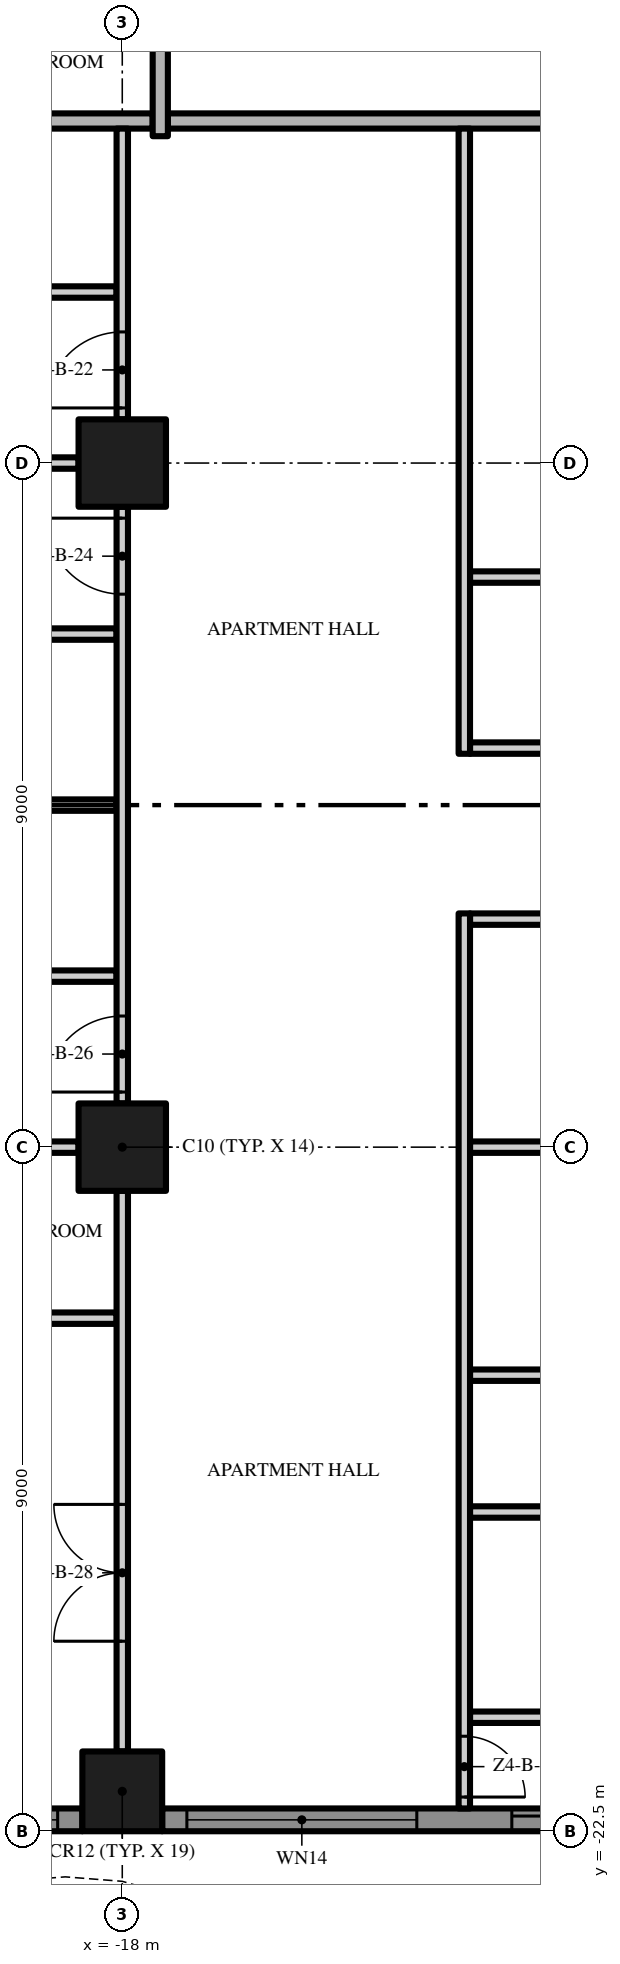
"""IFC4 building model, lengths in metres.
Left out: names, types, materials, properties, quantities, classifications, styles, units other than length and angle.
Written with IfcOpenShell. Run it as: python <this file> out.ifc"""

import sys

from ifc_helpers import new_model, si_unit, direction, frame, frame_2d, origin, origin_2d, place, context, subcontext, project, spatial, polyline, rectangle, outline, extrude, element, fill, save


model = new_model("IFC4")
c1 = context("Model", 3, precision=1e-05, world=origin(), true_north=direction((0.0, 1.0)))
c2 = subcontext(c1, "Body", "Model", "MODEL_VIEW")
j1 = project(units=[si_unit("LENGTHUNIT", "METRE"), si_unit("PLANEANGLEUNIT", "RADIAN")], contexts=[c1])
p1 = place(None, origin())
s1 = spatial("IfcSite", under=j1, at=p1, CompositionType="ELEMENT")
p2 = place(p1, origin())
s2 = spatial("IfcBuilding", under=s1, at=p2, CompositionType="ELEMENT")
p3 = place(p2, frame((0.0, 0.0, 195.8)))
s3 = spatial("IfcBuildingStorey", under=s2, at=p3, CompositionType="ELEMENT", Elevation=195.8)
p4 = place(p3, frame((-18.0, -13.5, 0.0), z_axis=(0.0, 0.0, 1.0), x_axis=(1.0, 0.0, 0.0)))
e1 = element("IfcColumn", 1, at=p4, inside=s3, PredefinedType="COLUMN", context=c2, shape_type="SweptSolid", body=[
    extrude(rectangle(XDim=1.15, YDim=1.15, at=origin_2d()), origin(), (0.0, 0.0, 1.0), 3.5),
])
p5 = place(p3, frame((-18.0, -21.975, 0.0), z_axis=(0.0, 0.0, 1.0), x_axis=(1.0, 0.0, 0.0)))
e2 = element("IfcColumn", 2, at=p5, inside=s3, PredefinedType="COLUMN", context=c2, shape_type="SweptSolid", body=[
    extrude(rectangle(XDim=1.05, YDim=1.05, at=origin_2d()), origin(), (0.0, 0.0, 1.0), 3.5),
])
p6 = place(p3, frame((-18.0, -4.5, 0.0), z_axis=(0.0, 0.0, 1.0), x_axis=(1.0, 0.0, 0.0)))
e3 = element("IfcColumn", 3, at=p6, inside=s3, PredefinedType="COLUMN", context=c2, shape_type="SweptSolid", body=[
    extrude(rectangle(XDim=1.15, YDim=1.15, at=origin_2d()), origin(), (0.0, 0.0, 1.0), 3.5),
])
p7 = place(p3, frame((-18.525, -22.35, 0.0), z_axis=(0.0, 0.0, 1.0), x_axis=(-1.0, 0.0, 0.0)))
e4 = element("IfcWall", 4, at=p7, inside=s3, PredefinedType="SOLIDWALL", context=c2, shape_type="SweptSolid", body=[
    extrude(rectangle(XDim=3.675, YDim=0.3, at=frame_2d((1.837, 0.0))), origin(), (0.0, 0.0, 1.0), 3.5),
])
p8 = place(p7, frame((0.325, 0.0, 0.45)))
e5 = element("IfcOpeningElement", 5, at=p8, cuts=e4, PredefinedType="OPENING", context=c2, shape_type="SweptSolid", body=[
    extrude(rectangle(XDim=3.025, YDim=2.65, at=frame_2d((1.512, 1.325))), frame((0.0, 0.16, 0.0), z_axis=(0.0, -1.0, 0.0), x_axis=(1.0, 0.0, 0.0)), (0.0, 0.0, 1.0), 0.32),
])
p9 = place(p3, frame((-9.525, -22.35, 0.0), z_axis=(0.0, 0.0, 1.0), x_axis=(-1.0, 0.0, 0.0)))
e6 = element("IfcWall", 6, at=p9, inside=s3, PredefinedType="SOLIDWALL", context=c2, shape_type="SweptSolid", body=[
    extrude(rectangle(XDim=7.95, YDim=0.3, at=frame_2d((3.975, 0.0))), origin(), (0.0, 0.0, 1.0), 3.5),
])
p10 = place(p9, frame((4.6, 0.0, 0.45)))
e7 = element("IfcOpeningElement", 7, at=p10, cuts=e6, PredefinedType="OPENING", context=c2, shape_type="SweptSolid", body=[
    extrude(rectangle(XDim=3.025, YDim=2.65, at=frame_2d((1.512, 1.325))), frame((0.0, 0.16, 0.0), z_axis=(0.0, -1.0, 0.0), x_axis=(1.0, 0.0, 0.0)), (0.0, 0.0, 1.0), 0.32),
])
p11 = place(p9, frame((0.325, 0.0, 0.0)))
e8 = element("IfcOpeningElement", 8, at=p11, cuts=e6, PredefinedType="OPENING", context=c2, shape_type="SweptSolid", body=[
    extrude(rectangle(XDim=3.025, YDim=2.4, at=frame_2d((1.512, 1.2))), frame((0.0, 0.16, 0.0), z_axis=(0.0, -1.0, 0.0), x_axis=(1.0, 0.0, 0.0)), (0.0, 0.0, 1.0), 0.32),
])
p12 = place(p3, origin())
e9 = element("IfcWall", 9, at=p12, inside=s3, PredefinedType="USERDEFINED", context=c2, shape_type="SweptSolid", body=[
    extrude(outline(polyline([(-22.5, -24.3), (-21.0, -23.595), (-19.5, -23.159), (-18.75, -23.1), (-18.0, -23.159), (-16.5, -23.595), (-15.0, -24.3), (-13.5, -25.005), (-12.0, -25.441), (-11.25, -25.5), (-10.5, -25.441), (-9.0, -25.005), (-7.5, -24.3), (-6.0, -23.595), (-4.5, -23.159), (-3.75, -23.1), (-3.0, -23.159), (-1.5, -23.595), (0.0, -24.3), (1.5, -25.005), (3.0, -25.441), (3.75, -25.5), (4.5, -25.441), (6.0, -25.005), (7.5, -24.3), (9.0, -23.595), (10.5, -23.159), (11.25, -23.1), (12.0, -23.159), (13.5, -23.595), (15.0, -24.3), (16.5, -25.005), (18.0, -25.441), (18.75, -25.5), (19.5, -25.441), (21.0, -25.005), (22.5, -24.3), (22.394, -24.074), (20.911, -24.771), (19.455, -25.194), (18.75, -25.249), (18.045, -25.194), (16.589, -24.771), (15.106, -24.074), (13.589, -23.36), (12.045, -22.911), (11.25, -22.849), (10.455, -22.911), (8.911, -23.36), (7.394, -24.074), (5.911, -24.771), (4.455, -25.194), (3.75, -25.249), (3.045, -25.194), (1.589, -24.771), (0.106, -24.074), (-1.411, -23.36), (-2.955, -22.911), (-3.75, -22.849), (-4.545, -22.911), (-6.089, -23.36), (-7.606, -24.074), (-9.089, -24.771), (-10.545, -25.194), (-11.25, -25.249), (-11.955, -25.194), (-13.411, -24.771), (-14.894, -24.074), (-16.411, -23.36), (-17.955, -22.911), (-18.75, -22.849), (-19.545, -22.911), (-21.089, -23.36), (-22.606, -24.074), (-22.5, -24.3)])), origin(), (0.0, 0.0, 1.0), 0.9),
])
for number, where, z_axis, x_axis in (
    (10, (-13.425, -21.0, 0.0), (0.0, 0.0, 1.0), (1.0, 0.0, 0.0)),
    (11, (-13.425, -18.3, 0.0), (0.0, 0.0, 1.0), (1.0, 0.0, 0.0)),
    (12, (-13.425, -16.5, 0.0), (0.0, 0.0, 1.0), (1.0, 0.0, 0.0)),
):
    element("IfcWall", number, at=place(p3, frame(where, z_axis=z_axis, x_axis=x_axis)), inside=s3, PredefinedType="PARTITIONING", context=c2, shape_type="SweptSolid", body=[
        extrude(rectangle(XDim=4.35, YDim=0.15, at=frame_2d((2.175, 0.0))), origin(), (0.0, 0.0, 1.0), 3.5),
    ])
p13 = place(p3, frame((-20.925, -15.75, 0.0), z_axis=(0.0, 0.0, 1.0), x_axis=(1.0, 0.0, 0.0)))
e13 = element("IfcWall", 13, at=p13, inside=s3, PredefinedType="PARTITIONING", context=c2, shape_type="SweptSolid", body=[
    extrude(rectangle(XDim=2.85, YDim=0.15, at=frame_2d((1.425, 0.0))), origin(), (0.0, 0.0, 1.0), 3.5),
])
p14 = place(p3, frame((-25.95, -13.5, 0.0), z_axis=(0.0, 0.0, 1.0), x_axis=(1.0, 0.0, 0.0)))
e14 = element("IfcWall", 14, at=p14, inside=s3, PredefinedType="PARTITIONING", context=c2, shape_type="SweptSolid", body=[
    extrude(rectangle(XDim=7.375, YDim=0.15, at=frame_2d((3.688, 0.0))), origin(), (0.0, 0.0, 1.0), 3.5),
])
p15 = place(p3, frame((-13.425, -13.5, 0.0), z_axis=(0.0, 0.0, 1.0), x_axis=(1.0, 0.0, 0.0)))
e15 = element("IfcWall", 15, at=p15, inside=s3, PredefinedType="PARTITIONING", context=c2, shape_type="SweptSolid", body=[
    extrude(rectangle(XDim=3.85, YDim=0.15, at=frame_2d((1.925, 0.0))), origin(), (0.0, 0.0, 1.0), 3.5),
])
p16 = place(p3, frame((-20.925, -11.25, 0.0), z_axis=(0.0, 0.0, 1.0), x_axis=(1.0, 0.0, 0.0)))
e16 = element("IfcWall", 16, at=p16, inside=s3, PredefinedType="PARTITIONING", context=c2, shape_type="SweptSolid", body=[
    extrude(rectangle(XDim=2.85, YDim=0.15, at=frame_2d((1.425, 0.0))), origin(), (0.0, 0.0, 1.0), 3.5),
])
p17 = place(p3, frame((-13.425, -10.5, 0.0), z_axis=(0.0, 0.0, 1.0), x_axis=(1.0, 0.0, 0.0)))
e17 = element("IfcWall", 17, at=p17, inside=s3, PredefinedType="PARTITIONING", context=c2, shape_type="SweptSolid", body=[
    extrude(rectangle(XDim=4.35, YDim=0.15, at=frame_2d((2.175, 0.0))), origin(), (0.0, 0.0, 1.0), 3.5),
])
p18 = place(p3, frame((-20.925, -9.0, 0.0), z_axis=(0.0, 0.0, 1.0), x_axis=(1.0, 0.0, 0.0)))
e18 = element("IfcWall", 18, at=p18, inside=s3, PredefinedType="PARTITIONING", context=c2, shape_type="SweptSolid", body=[
    extrude(rectangle(XDim=2.85, YDim=0.15, at=frame_2d((1.425, 0.0))), origin(), (0.0, 0.0, 1.0), 3.5),
])
p19 = place(p3, frame((-13.425, -8.25, 0.0), z_axis=(0.0, 0.0, 1.0), x_axis=(1.0, 0.0, 0.0)))
e19 = element("IfcWall", 19, at=p19, inside=s3, PredefinedType="PARTITIONING", context=c2, shape_type="SweptSolid", body=[
    extrude(rectangle(XDim=4.35, YDim=0.15, at=frame_2d((2.175, 0.0))), origin(), (0.0, 0.0, 1.0), 3.5),
])
p20 = place(p19, frame((1.75, 0.0, 0.0)))
e20 = element("IfcOpeningElement", 20, at=p20, cuts=e19, PredefinedType="OPENING", context=c2, shape_type="SweptSolid", body=[
    extrude(rectangle(XDim=0.9, YDim=2.1, at=frame_2d((0.45, 1.05))), frame((0.0, 0.085, 0.0), z_axis=(0.0, -1.0, 0.0), x_axis=(1.0, 0.0, 0.0)), (0.0, 0.0, 1.0), 0.17),
])
p21 = place(p3, frame((-20.925, -6.75, 0.0), z_axis=(0.0, 0.0, 1.0), x_axis=(1.0, 0.0, 0.0)))
e21 = element("IfcWall", 21, at=p21, inside=s3, PredefinedType="PARTITIONING", context=c2, shape_type="SweptSolid", body=[
    extrude(rectangle(XDim=2.85, YDim=0.15, at=frame_2d((1.425, 0.0))), origin(), (0.0, 0.0, 1.0), 3.5),
])
p22 = place(p3, frame((-13.425, -6.0, 0.0), z_axis=(0.0, 0.0, 1.0), x_axis=(1.0, 0.0, 0.0)))
e22 = element("IfcWall", 22, at=p22, inside=s3, PredefinedType="PARTITIONING", context=c2, shape_type="SweptSolid", body=[
    extrude(rectangle(XDim=4.35, YDim=0.15, at=frame_2d((2.175, 0.0))), origin(), (0.0, 0.0, 1.0), 3.5),
])
p23 = place(p3, frame((-25.95, -4.5, 0.0), z_axis=(0.0, 0.0, 1.0), x_axis=(1.0, 0.0, 0.0)))
e23 = element("IfcWall", 23, at=p23, inside=s3, PredefinedType="PARTITIONING", context=c2, shape_type="SweptSolid", body=[
    extrude(rectangle(XDim=7.375, YDim=0.15, at=frame_2d((3.688, 0.0))), origin(), (0.0, 0.0, 1.0), 3.5),
])
p24 = place(p3, frame((-20.925, -2.25, 0.0), z_axis=(0.0, 0.0, 1.0), x_axis=(1.0, 0.0, 0.0)))
e24 = element("IfcWall", 24, at=p24, inside=s3, PredefinedType="PARTITIONING", context=c2, shape_type="SweptSolid", body=[
    extrude(rectangle(XDim=2.85, YDim=0.15, at=frame_2d((1.425, 0.0))), origin(), (0.0, 0.0, 1.0), 3.5),
])
p25 = place(p3, frame((-17.4, 0.0, 0.0), z_axis=(0.0, 0.0, 1.0), x_axis=(1.0, 0.0, 0.0)))
e25 = element("IfcWall", 25, at=p25, inside=s3, PredefinedType="PARTITIONING", context=c2, shape_type="SweptSolid", body=[
    extrude(rectangle(XDim=12.8, YDim=0.2, at=frame_2d((6.4, 0.0))), origin(), (0.0, 0.0, 1.0), 3.5),
])
p26 = place(p3, frame((-26.7, 0.0, 0.0), z_axis=(0.0, 0.0, 1.0), x_axis=(1.0, 0.0, 0.0)))
e26 = element("IfcWall", 26, at=p26, inside=s3, PredefinedType="PARTITIONING", context=c2, shape_type="SweptSolid", body=[
    extrude(rectangle(XDim=9.1, YDim=0.2, at=frame_2d((4.55, 0.0))), origin(), (0.0, 0.0, 1.0), 3.5),
])
p27 = place(p3, frame((-18.0, -21.45, 0.0), z_axis=(0.0, 0.0, 1.0), x_axis=(0.0, 1.0, 0.0)))
e27 = element("IfcWall", 27, at=p27, inside=s3, PredefinedType="PARTITIONING", context=c2, shape_type="SweptSolid", body=[
    extrude(rectangle(XDim=7.375, YDim=0.15, at=frame_2d((3.688, 0.0))), origin(), (0.0, 0.0, 1.0), 3.5),
])
p28 = place(p27, frame((1.45, 0.0, 0.0)))
e28 = element("IfcOpeningElement", 28, at=p28, cuts=e27, PredefinedType="OPENING", context=c2, shape_type="SweptSolid", body=[
    extrude(rectangle(XDim=1.8, YDim=2.4, at=frame_2d((0.9, 1.2))), frame((0.0, 0.085, 0.0), z_axis=(0.0, -1.0, 0.0), x_axis=(1.0, 0.0, 0.0)), (0.0, 0.0, 1.0), 0.17),
])
p29 = place(p3, frame((-18.0, -12.925, 0.0), z_axis=(0.0, 0.0, 1.0), x_axis=(0.0, 1.0, 0.0)))
e29 = element("IfcWall", 29, at=p29, inside=s3, PredefinedType="PARTITIONING", context=c2, shape_type="SweptSolid", body=[
    extrude(rectangle(XDim=7.85, YDim=0.15, at=frame_2d((3.925, 0.0))), origin(), (0.0, 0.0, 1.0), 3.5),
])
p30 = place(p29, frame((6.7, 0.0, 0.0)))
e30 = element("IfcOpeningElement", 30, at=p30, cuts=e29, PredefinedType="OPENING", context=c2, shape_type="SweptSolid", body=[
    extrude(rectangle(XDim=1.0, YDim=2.4, at=frame_2d((0.5, 1.2))), frame((0.0, 0.085, 0.0), z_axis=(0.0, -1.0, 0.0), x_axis=(1.0, 0.0, 0.0)), (0.0, 0.0, 1.0), 0.17),
])
p31 = place(p29, frame((0.15, 0.0, 0.0)))
e31 = element("IfcOpeningElement", 31, at=p31, cuts=e29, PredefinedType="OPENING", context=c2, shape_type="SweptSolid", body=[
    extrude(rectangle(XDim=1.0, YDim=2.4, at=frame_2d((0.5, 1.2))), frame((0.0, 0.085, 0.0), z_axis=(0.0, -1.0, 0.0), x_axis=(1.0, 0.0, 0.0)), (0.0, 0.0, 1.0), 0.17),
])
p32 = place(p3, frame((-18.0, -3.925, 0.0), z_axis=(0.0, 0.0, 1.0), x_axis=(0.0, 1.0, 0.0)))
e32 = element("IfcWall", 32, at=p32, inside=s3, PredefinedType="PARTITIONING", context=c2, shape_type="SweptSolid", body=[
    extrude(rectangle(XDim=3.825, YDim=0.15, at=frame_2d((1.913, 0.0))), origin(), (0.0, 0.0, 1.0), 3.5),
])
p33 = place(p32, frame((0.15, 0.0, 0.0)))
e33 = element("IfcOpeningElement", 33, at=p33, cuts=e32, PredefinedType="OPENING", context=c2, shape_type="SweptSolid", body=[
    extrude(rectangle(XDim=1.0, YDim=2.4, at=frame_2d((0.5, 1.2))), frame((0.0, 0.085, 0.0), z_axis=(0.0, -1.0, 0.0), x_axis=(1.0, 0.0, 0.0)), (0.0, 0.0, 1.0), 0.17),
])
p34 = place(p3, frame((-17.5, -0.2, 0.0), z_axis=(0.0, 0.0, 1.0), x_axis=(0.0, 1.0, 0.0)))
e34 = element("IfcWall", 34, at=p34, inside=s3, PredefinedType="PARTITIONING", context=c2, shape_type="SweptSolid", body=[
    extrude(rectangle(XDim=4.125, YDim=0.2, at=frame_2d((2.062, 0.0))), origin(), (0.0, 0.0, 1.0), 3.5),
])
p35 = place(p3, frame((-13.5, -10.425, 0.0), z_axis=(0.0, 0.0, 1.0), x_axis=(0.0, -1.0, 0.0)))
e35 = element("IfcWall", 35, at=p35, inside=s3, PredefinedType="PARTITIONING", context=c2, shape_type="SweptSolid", body=[
    extrude(rectangle(XDim=11.775, YDim=0.15, at=frame_2d((5.888, 0.0))), origin(), (0.0, 0.0, 1.0), 3.5),
])
p36 = place(p35, frame((10.825, 0.0, 0.0)))
e36 = element("IfcOpeningElement", 36, at=p36, cuts=e35, PredefinedType="OPENING", context=c2, shape_type="SweptSolid", body=[
    extrude(rectangle(XDim=0.8, YDim=2.0, at=frame_2d((0.4, 1.0))), frame((0.0, 0.085, 0.0), z_axis=(0.0, -1.0, 0.0), x_axis=(1.0, 0.0, 0.0)), (0.0, 0.0, 1.0), 0.17),
])
p37 = place(p3, frame((-13.5, -8.325, 0.0), z_axis=(0.0, 0.0, 1.0), x_axis=(0.0, 1.0, 0.0)))
e37 = element("IfcWall", 37, at=p37, inside=s3, PredefinedType="PARTITIONING", context=c2, shape_type="SweptSolid", body=[
    extrude(rectangle(XDim=8.225, YDim=0.15, at=frame_2d((4.112, 0.0))), origin(), (0.0, 0.0, 1.0), 3.5),
])
p38 = place(p8, origin())
e38 = element("IfcWindow", 38, at=p38, inside=s3, PartitioningType="SINGLE_PANEL", PredefinedType="WINDOW", context=c2, shape_type="SweptSolid", body=[
    extrude(rectangle(XDim=3.025, YDim=2.65, at=frame_2d((1.512, 1.325))), frame((0.0, 0.03, 0.0), z_axis=(0.0, -1.0, 0.0), x_axis=(1.0, 0.0, 0.0)), (0.0, 0.0, 1.0), 0.06),
])
fill(e5, e38)
p39 = place(p10, origin())
e39 = element("IfcWindow", 39, at=p39, inside=s3, PartitioningType="SINGLE_PANEL", PredefinedType="WINDOW", context=c2, shape_type="SweptSolid", body=[
    extrude(rectangle(XDim=3.025, YDim=2.65, at=frame_2d((1.512, 1.325))), frame((0.0, 0.03, 0.0), z_axis=(0.0, -1.0, 0.0), x_axis=(1.0, 0.0, 0.0)), (0.0, 0.0, 1.0), 0.06),
])
fill(e7, e39)
p40 = place(p11, origin())
e40 = element("IfcDoor", 40, at=p40, inside=s3, OperationType="SINGLE_SWING_LEFT", PredefinedType="DOOR", context=c2, shape_type="SweptSolid", body=[
    extrude(rectangle(XDim=3.025, YDim=2.4, at=frame_2d((1.512, 1.2))), frame((0.0, 0.025, 0.0), z_axis=(0.0, -1.0, 0.0), x_axis=(1.0, 0.0, 0.0)), (0.0, 0.0, 1.0), 0.05),
])
fill(e8, e40)
p41 = place(p36, origin())
e41 = element("IfcDoor", 41, at=p41, inside=s3, OperationType="SINGLE_SWING_RIGHT", PredefinedType="DOOR", context=c2, shape_type="SweptSolid", body=[
    extrude(rectangle(XDim=0.8, YDim=2.0, at=frame_2d((0.4, 1.0))), frame((0.0, 0.025, 0.0), z_axis=(0.0, -1.0, 0.0), x_axis=(1.0, 0.0, 0.0)), (0.0, 0.0, 1.0), 0.05),
])
fill(e36, e41)
p42 = place(p33, origin())
e42 = element("IfcDoor", 42, at=p42, inside=s3, OperationType="SINGLE_SWING_LEFT", PredefinedType="DOOR", context=c2, shape_type="SweptSolid", body=[
    extrude(rectangle(XDim=1.0, YDim=2.4, at=frame_2d((0.5, 1.2))), frame((0.0, 0.025, 0.0), z_axis=(0.0, -1.0, 0.0), x_axis=(1.0, 0.0, 0.0)), (0.0, 0.0, 1.0), 0.05),
])
fill(e33, e42)
p43 = place(p30, origin())
e43 = element("IfcDoor", 43, at=p43, inside=s3, OperationType="SINGLE_SWING_RIGHT", PredefinedType="DOOR", context=c2, shape_type="SweptSolid", body=[
    extrude(rectangle(XDim=1.0, YDim=2.4, at=frame_2d((0.5, 1.2))), frame((0.0, 0.025, 0.0), z_axis=(0.0, -1.0, 0.0), x_axis=(1.0, 0.0, 0.0)), (0.0, 0.0, 1.0), 0.05),
])
fill(e30, e43)
p44 = place(p31, origin())
e44 = element("IfcDoor", 44, at=p44, inside=s3, OperationType="SINGLE_SWING_LEFT", PredefinedType="DOOR", context=c2, shape_type="SweptSolid", body=[
    extrude(rectangle(XDim=1.0, YDim=2.4, at=frame_2d((0.5, 1.2))), frame((0.0, 0.025, 0.0), z_axis=(0.0, -1.0, 0.0), x_axis=(1.0, 0.0, 0.0)), (0.0, 0.0, 1.0), 0.05),
])
fill(e31, e44)
p45 = place(p28, origin())
e45 = element("IfcDoor", 45, at=p45, inside=s3, OperationType="DOUBLE_DOOR_SINGLE_SWING", PredefinedType="DOOR", context=c2, shape_type="SweptSolid", body=[
    extrude(rectangle(XDim=1.8, YDim=2.4, at=frame_2d((0.9, 1.2))), frame((0.0, 0.025, 0.0), z_axis=(0.0, -1.0, 0.0), x_axis=(1.0, 0.0, 0.0)), (0.0, 0.0, 1.0), 0.05),
])
fill(e28, e45)
save(model, sys.argv[1])
